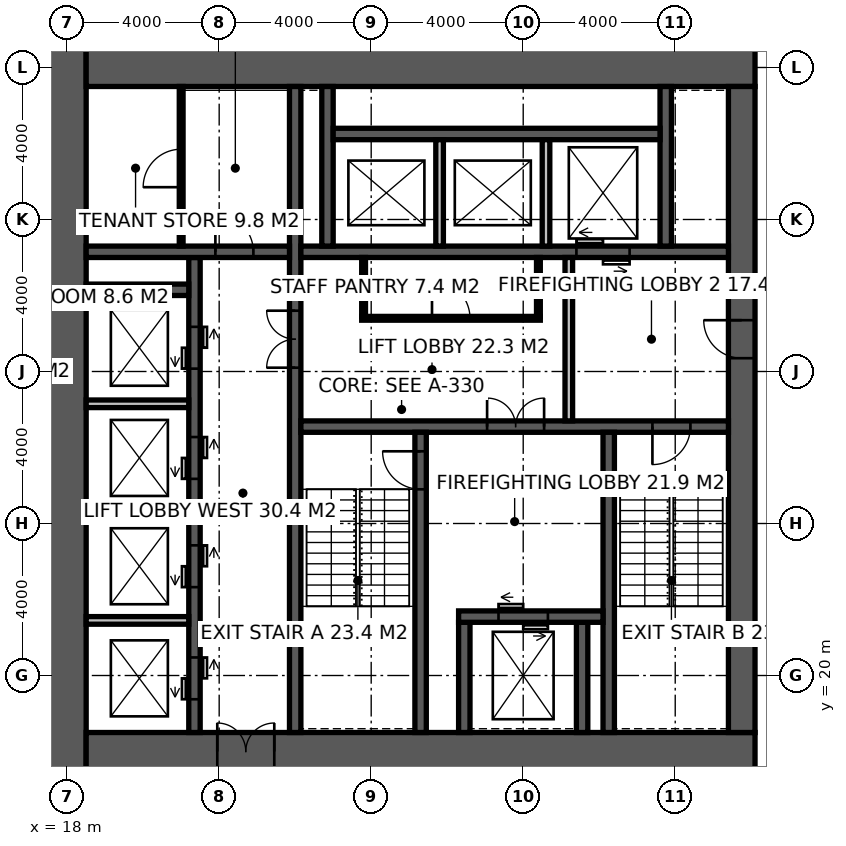
"""IFC4 building model, lengths in metres.
Left out: names, types, materials, properties, quantities, classifications, styles, units other than length and angle.
Written with IfcOpenShell. Run it as: python <this file> out.ifc"""

import sys

from ifc_helpers import new_model, si_unit, direction, frame, frame_2d, origin, place, context, subcontext, project, spatial, rectangle, extrude, element, fill, save


model = new_model("IFC4")
c1 = context("Model", 3, precision=1e-05, world=origin(), true_north=direction((0.0, 1.0)))
c2 = subcontext(c1, "Body", "Model", "MODEL_VIEW")
j1 = project(units=[si_unit("LENGTHUNIT", "METRE"), si_unit("PLANEANGLEUNIT", "RADIAN")], contexts=[c1])
p1 = place(None, origin())
s1 = spatial("IfcSite", under=j1, at=p1, CompositionType="ELEMENT")
p2 = place(p1, origin())
s2 = spatial("IfcBuilding", under=s1, at=p2, CompositionType="ELEMENT")
p3 = place(p2, frame((0.0, 0.0, 171.8)))
s3 = spatial("IfcBuildingStorey", under=s2, at=p3, CompositionType="ELEMENT", Elevation=171.8)
p4 = place(p3, frame((18.0, 17.5, -0.15), z_axis=(0.0, 0.0, 1.0), x_axis=(0.0, 1.0, 0.0)))
e1 = element("IfcWall", 1, at=p4, inside=s3, PredefinedType="SHEAR", context=c2, shape_type="SweptSolid", body=[
    extrude(rectangle(XDim=19.0, YDim=1.0, at=frame_2d((9.5, 0.0))), origin(), (0.0, 0.0, 1.0), 4.0),
])
p5 = place(p3, frame((18.5, 18.0, -0.15), z_axis=(0.0, 0.0, 1.0), x_axis=(1.0, 0.0, 0.0)))
e2 = element("IfcWall", 2, at=p5, inside=s3, PredefinedType="SHEAR", context=c2, shape_type="SweptSolid", body=[
    extrude(rectangle(XDim=17.6, YDim=1.0, at=frame_2d((8.8, 0.0))), origin(), (0.0, 0.0, 1.0), 4.0),
])
p6 = place(p5, frame((3.45, 0.0, 0.15)))
e3 = element("IfcOpeningElement", 3, at=p6, cuts=e2, PredefinedType="OPENING", context=c2, shape_type="SweptSolid", body=[
    extrude(rectangle(XDim=1.5, YDim=2.4, at=frame_2d((0.75, 1.2))), frame((0.0, 0.51, 0.0), z_axis=(0.0, -1.0, 0.0), x_axis=(1.0, 0.0, 0.0)), (0.0, 0.0, 1.0), 1.02),
])
p7 = place(p3, frame((18.5, 36.0, -0.15), z_axis=(0.0, 0.0, 1.0), x_axis=(1.0, 0.0, 0.0)))
e4 = element("IfcWall", 4, at=p7, inside=s3, PredefinedType="SHEAR", context=c2, shape_type="SweptSolid", body=[
    extrude(rectangle(XDim=17.6, YDim=1.0, at=frame_2d((8.8, 0.0))), origin(), (0.0, 0.0, 1.0), 4.0),
])
p8 = place(p3, frame((35.75, 18.5, -0.15), z_axis=(0.0, 0.0, 1.0), x_axis=(0.0, 1.0, 0.0)))
e5 = element("IfcWall", 5, at=p8, inside=s3, PredefinedType="SHEAR", context=c2, shape_type="SweptSolid", body=[
    extrude(rectangle(XDim=17.0, YDim=0.7, at=frame_2d((8.5, 0.0))), origin(), (0.0, 0.0, 1.0), 4.0),
])
p9 = place(p8, frame((9.85, 0.0, 0.15)))
e6 = element("IfcOpeningElement", 6, at=p9, cuts=e5, PredefinedType="OPENING", context=c2, shape_type="SweptSolid", body=[
    extrude(rectangle(XDim=1.0, YDim=2.2, at=frame_2d((0.5, 1.1))), frame((0.0, 0.36, 0.0), z_axis=(0.0, -1.0, 0.0), x_axis=(1.0, 0.0, 0.0)), (0.0, 0.0, 1.0), 0.72),
])
p10 = place(p3, frame((24.0, 18.5, -0.15), z_axis=(0.0, 0.0, 1.0), x_axis=(0.0, 1.0, 0.0)))
e7 = element("IfcWall", 7, at=p10, inside=s3, PredefinedType="SHEAR", context=c2, shape_type="SweptSolid", body=[
    extrude(rectangle(XDim=17.0, YDim=0.3, at=frame_2d((8.5, 0.0))), origin(), (0.0, 0.0, 1.0), 4.0),
])
p11 = place(p10, frame((9.6, 0.0, 0.15)))
e8 = element("IfcOpeningElement", 8, at=p11, cuts=e7, PredefinedType="OPENING", context=c2, shape_type="SweptSolid", body=[
    extrude(rectangle(XDim=1.5, YDim=2.4, at=frame_2d((0.75, 1.2))), frame((0.0, 0.16, 0.0), z_axis=(0.0, -1.0, 0.0), x_axis=(1.0, 0.0, 0.0)), (0.0, 0.0, 1.0), 0.32),
])
p12 = place(p3, frame((24.15, 26.55, -0.15), z_axis=(0.0, 0.0, 1.0), x_axis=(1.0, 0.0, 0.0)))
e9 = element("IfcWall", 9, at=p12, inside=s3, PredefinedType="SHEAR", context=c2, shape_type="SweptSolid", body=[
    extrude(rectangle(XDim=11.25, YDim=0.3, at=frame_2d((5.625, 0.0))), origin(), (0.0, 0.0, 1.0), 4.0),
])
p13 = place(p12, frame((9.25, 0.0, 0.15)))
e10 = element("IfcOpeningElement", 10, at=p13, cuts=e9, PredefinedType="OPENING", context=c2, shape_type="SweptSolid", body=[
    extrude(rectangle(XDim=1.0, YDim=2.2, at=frame_2d((0.5, 1.1))), frame((0.0, 0.16, 0.0), z_axis=(0.0, -1.0, 0.0), x_axis=(1.0, 0.0, 0.0)), (0.0, 0.0, 1.0), 0.32),
])
p14 = place(p12, frame((4.9, 0.0, 0.15)))
e11 = element("IfcOpeningElement", 11, at=p14, cuts=e9, PredefinedType="OPENING", context=c2, shape_type="SweptSolid", body=[
    extrude(rectangle(XDim=1.5, YDim=2.4, at=frame_2d((0.75, 1.2))), frame((0.0, 0.16, 0.0), z_axis=(0.0, -1.0, 0.0), x_axis=(1.0, 0.0, 0.0)), (0.0, 0.0, 1.0), 0.32),
])
p15 = place(p3, frame((27.3, 18.5, -0.15), z_axis=(0.0, 0.0, 1.0), x_axis=(0.0, 1.0, 0.0)))
e12 = element("IfcWall", 12, at=p15, inside=s3, PredefinedType="SHEAR", context=c2, shape_type="SweptSolid", body=[
    extrude(rectangle(XDim=7.9, YDim=0.3, at=frame_2d((3.95, 0.0))), origin(), (0.0, 0.0, 1.0), 4.0),
])
p16 = place(p15, frame((6.4, 0.0, 0.15)))
e13 = element("IfcOpeningElement", 13, at=p16, cuts=e12, PredefinedType="OPENING", context=c2, shape_type="SweptSolid", body=[
    extrude(rectangle(XDim=1.0, YDim=2.2, at=frame_2d((0.5, 1.1))), frame((0.0, 0.16, 0.0), z_axis=(0.0, -1.0, 0.0), x_axis=(1.0, 0.0, 0.0)), (0.0, 0.0, 1.0), 0.32),
])
p17 = place(p3, frame((32.25, 18.5, -0.15), z_axis=(0.0, 0.0, 1.0), x_axis=(0.0, 1.0, 0.0)))
e14 = element("IfcWall", 14, at=p17, inside=s3, PredefinedType="SHEAR", context=c2, shape_type="SweptSolid", body=[
    extrude(rectangle(XDim=7.9, YDim=0.3, at=frame_2d((3.95, 0.0))), origin(), (0.0, 0.0, 1.0), 4.0),
])
for number, where, z_axis, x_axis in (
    (15, (28.45, 18.5, -0.15), (0.0, 0.0, 1.0), (0.0, 1.0, 0.0)),
    (16, (31.55, 18.5, -0.15), (0.0, 0.0, 1.0), (0.0, 1.0, 0.0)),
):
    element("IfcWall", number, at=place(p3, frame(where, z_axis=z_axis, x_axis=x_axis)), inside=s3, PredefinedType="SHEAR", context=c2, shape_type="SweptSolid", body=[
        extrude(rectangle(XDim=2.9, YDim=0.3, at=frame_2d((1.45, 0.0))), origin(), (0.0, 0.0, 1.0), 4.0),
    ])
p18 = place(p3, frame((28.3, 21.55, -0.15), z_axis=(0.0, 0.0, 1.0), x_axis=(1.0, 0.0, 0.0)))
e17 = element("IfcWall", 17, at=p18, inside=s3, PredefinedType="SHEAR", context=c2, shape_type="SweptSolid", body=[
    extrude(rectangle(XDim=3.8, YDim=0.3, at=frame_2d((1.9, 0.0))), origin(), (0.0, 0.0, 1.0), 4.0),
])
p19 = place(p18, frame((1.05, 0.0, 0.15)))
e18 = element("IfcOpeningElement", 18, at=p19, cuts=e17, PredefinedType="OPENING", context=c2, shape_type="SweptSolid", body=[
    extrude(rectangle(XDim=1.3, YDim=2.4, at=frame_2d((0.65, 1.2))), frame((0.0, 0.16, 0.0), z_axis=(0.0, -1.0, 0.0), x_axis=(1.0, 0.0, 0.0)), (0.0, 0.0, 1.0), 0.32),
])
p20 = place(p3, frame((24.15, 31.15, -0.15), z_axis=(0.0, 0.0, 1.0), x_axis=(1.0, 0.0, 0.0)))
e19 = element("IfcWall", 19, at=p20, inside=s3, PredefinedType="SHEAR", context=c2, shape_type="SweptSolid", body=[
    extrude(rectangle(XDim=11.25, YDim=0.3, at=frame_2d((5.625, 0.0))), origin(), (0.0, 0.0, 1.0), 4.0),
])
p21 = place(p20, frame((7.25, 0.0, 0.15)))
e20 = element("IfcOpeningElement", 20, at=p21, cuts=e19, PredefinedType="OPENING", context=c2, shape_type="SweptSolid", body=[
    extrude(rectangle(XDim=1.4, YDim=2.4, at=frame_2d((0.7, 1.2))), frame((0.0, 0.16, 0.0), z_axis=(0.0, -1.0, 0.0), x_axis=(1.0, 0.0, 0.0)), (0.0, 0.0, 1.0), 0.32),
])
p22 = place(p3, frame((21.35, 18.5, -0.15), z_axis=(0.0, 0.0, 1.0), x_axis=(0.0, 1.0, 0.0)))
e21 = element("IfcWall", 21, at=p22, inside=s3, PredefinedType="SHEAR", context=c2, shape_type="SweptSolid", body=[
    extrude(rectangle(XDim=12.5, YDim=0.3, at=frame_2d((6.25, 0.0))), origin(), (0.0, 0.0, 1.0), 4.0),
])
p23 = place(p22, frame((0.875, 0.0, 0.15)))
e22 = element("IfcOpeningElement", 22, at=p23, cuts=e21, PredefinedType="OPENING", context=c2, shape_type="SweptSolid", body=[
    extrude(rectangle(XDim=1.1, YDim=2.2, at=frame_2d((0.55, 1.1))), frame((0.0, 0.16, 0.0), z_axis=(0.0, -1.0, 0.0), x_axis=(1.0, 0.0, 0.0)), (0.0, 0.0, 1.0), 0.32),
])
p24 = place(p22, frame((3.825, 0.0, 0.15)))
e23 = element("IfcOpeningElement", 23, at=p24, cuts=e21, PredefinedType="OPENING", context=c2, shape_type="SweptSolid", body=[
    extrude(rectangle(XDim=1.1, YDim=2.2, at=frame_2d((0.55, 1.1))), frame((0.0, 0.16, 0.0), z_axis=(0.0, -1.0, 0.0), x_axis=(1.0, 0.0, 0.0)), (0.0, 0.0, 1.0), 0.32),
])
p25 = place(p22, frame((6.675, 0.0, 0.15)))
e24 = element("IfcOpeningElement", 24, at=p25, cuts=e21, PredefinedType="OPENING", context=c2, shape_type="SweptSolid", body=[
    extrude(rectangle(XDim=1.1, YDim=2.2, at=frame_2d((0.55, 1.1))), frame((0.0, 0.16, 0.0), z_axis=(0.0, -1.0, 0.0), x_axis=(1.0, 0.0, 0.0)), (0.0, 0.0, 1.0), 0.32),
])
p26 = place(p22, frame((9.575, 0.0, 0.15)))
e25 = element("IfcOpeningElement", 25, at=p26, cuts=e21, PredefinedType="OPENING", context=c2, shape_type="SweptSolid", body=[
    extrude(rectangle(XDim=1.1, YDim=2.2, at=frame_2d((0.55, 1.1))), frame((0.0, 0.16, 0.0), z_axis=(0.0, -1.0, 0.0), x_axis=(1.0, 0.0, 0.0)), (0.0, 0.0, 1.0), 0.32),
])
p27 = place(p3, frame((18.5, 31.15, -0.15), z_axis=(0.0, 0.0, 1.0), x_axis=(1.0, 0.0, 0.0)))
e26 = element("IfcWall", 26, at=p27, inside=s3, PredefinedType="SHEAR", context=c2, shape_type="SweptSolid", body=[
    extrude(rectangle(XDim=5.35, YDim=0.3, at=frame_2d((2.675, 0.0))), origin(), (0.0, 0.0, 1.0), 4.0),
])
p28 = place(p27, frame((3.4, 0.0, 0.15)))
e27 = element("IfcOpeningElement", 27, at=p28, cuts=e26, PredefinedType="OPENING", context=c2, shape_type="SweptSolid", body=[
    extrude(rectangle(XDim=1.0, YDim=2.2, at=frame_2d((0.5, 1.1))), frame((0.0, 0.16, 0.0), z_axis=(0.0, -1.0, 0.0), x_axis=(1.0, 0.0, 0.0)), (0.0, 0.0, 1.0), 0.32),
])
p29 = place(p3, frame((18.5, 30.15, -0.15), z_axis=(0.0, 0.0, 1.0), x_axis=(1.0, 0.0, 0.0)))
e28 = element("IfcWall", 28, at=p29, inside=s3, PredefinedType="SHEAR", context=c2, shape_type="SweptSolid", body=[
    extrude(rectangle(XDim=2.7, YDim=0.3, at=frame_2d((1.35, 0.0))), origin(), (0.0, 0.0, 1.0), 4.0),
])
for number, where, z_axis, x_axis in (
    (29, (24.85, 31.3, -0.15), (0.0, 0.0, 1.0), (0.0, 1.0, 0.0)),
    (30, (33.75, 31.3, -0.15), (0.0, 0.0, 1.0), (0.0, 1.0, 0.0)),
):
    element("IfcWall", number, at=place(p3, frame(where, z_axis=z_axis, x_axis=x_axis)), inside=s3, PredefinedType="SHEAR", context=c2, shape_type="SweptSolid", body=[
        extrude(rectangle(XDim=4.2, YDim=0.3, at=frame_2d((2.1, 0.0))), origin(), (0.0, 0.0, 1.0), 4.0),
    ])
p30 = place(p3, frame((25.0, 34.25, -0.15), z_axis=(0.0, 0.0, 1.0), x_axis=(1.0, 0.0, 0.0)))
e31 = element("IfcWall", 31, at=p30, inside=s3, PredefinedType="SHEAR", context=c2, shape_type="SweptSolid", body=[
    extrude(rectangle(XDim=8.6, YDim=0.3, at=frame_2d((4.3, 0.0))), origin(), (0.0, 0.0, 1.0), 4.0),
])
for number, where, z_axis, x_axis in (
    (32, (27.8, 31.3, -0.15), (0.0, 0.0, 1.0), (0.0, 1.0, 0.0)),
    (33, (30.6, 31.3, -0.15), (0.0, 0.0, 1.0), (0.0, 1.0, 0.0)),
):
    element("IfcWall", number, at=place(p3, frame(where, z_axis=z_axis, x_axis=x_axis)), inside=s3, PredefinedType="SOLIDWALL", context=c2, shape_type="SweptSolid", body=[
        extrude(rectangle(XDim=2.8, YDim=0.2, at=frame_2d((1.4, 0.0))), origin(), (0.0, 0.0, 1.0), 4.0),
    ])
for number, where, z_axis, x_axis in (
    (34, (18.5, 21.45, -0.15), (0.0, 0.0, 1.0), (1.0, 0.0, 0.0)),
    (35, (18.5, 24.3, -0.15), (0.0, 0.0, 1.0), (1.0, 0.0, 0.0)),
    (36, (18.5, 27.15, -0.15), (0.0, 0.0, 1.0), (1.0, 0.0, 0.0)),
):
    element("IfcWall", number, at=place(p3, frame(where, z_axis=z_axis, x_axis=x_axis)), inside=s3, PredefinedType="SOLIDWALL", context=c2, shape_type="SweptSolid", body=[
        extrude(rectangle(XDim=2.7, YDim=0.2, at=frame_2d((1.35, 0.0))), origin(), (0.0, 0.0, 1.0), 4.0),
    ])
p31 = place(p3, frame((31.2, 26.7, 0.0), z_axis=(0.0, 0.0, 1.0), x_axis=(0.0, 1.0, 0.0)))
e37 = element("IfcWall", 37, at=p31, inside=s3, PredefinedType="SOLIDWALL", context=c2, shape_type="SweptSolid", body=[
    extrude(rectangle(XDim=4.3, YDim=0.2, at=frame_2d((2.15, 0.0))), origin(), (0.0, 0.0, 1.0), 3.85),
])
p32 = place(p3, frame((21.0, 31.3, 0.0), z_axis=(0.0, 0.0, 1.0), x_axis=(0.0, 1.0, 0.0)))
e38 = element("IfcWall", 38, at=p32, inside=s3, PredefinedType="PARTITIONING", context=c2, shape_type="SweptSolid", body=[
    extrude(rectangle(XDim=4.2, YDim=0.1, at=frame_2d((2.1, 0.0))), origin(), (0.0, 0.0, 1.0), 3.85),
])
p33 = place(p32, frame((1.55, 0.0, 0.0)))
e39 = element("IfcOpeningElement", 39, at=p33, cuts=e38, PredefinedType="OPENING", context=c2, shape_type="SweptSolid", body=[
    extrude(rectangle(XDim=1.0, YDim=2.2, at=frame_2d((0.5, 1.1))), frame((0.0, 0.06, 0.0), z_axis=(0.0, -1.0, 0.0), x_axis=(1.0, 0.0, 0.0)), (0.0, 0.0, 1.0), 0.12),
])
p34 = place(p3, frame((25.75, 29.4, 0.0), z_axis=(0.0, 0.0, 1.0), x_axis=(1.0, 0.0, 0.0)))
e40 = element("IfcWall", 40, at=p34, inside=s3, PredefinedType="PARTITIONING", context=c2, shape_type="SweptSolid", body=[
    extrude(rectangle(XDim=4.7, YDim=0.1, at=frame_2d((2.35, 0.0))), origin(), (0.0, 0.0, 1.0), 3.85),
])
p35 = place(p34, frame((1.85, 0.0, 0.0)))
e41 = element("IfcOpeningElement", 41, at=p35, cuts=e40, PredefinedType="OPENING", context=c2, shape_type="SweptSolid", body=[
    extrude(rectangle(XDim=1.0, YDim=2.2, at=frame_2d((0.5, 1.1))), frame((0.0, 0.06, 0.0), z_axis=(0.0, -1.0, 0.0), x_axis=(1.0, 0.0, 0.0)), (0.0, 0.0, 1.0), 0.12),
])
for number, where, z_axis, x_axis in (
    (42, (25.8, 29.45, 0.0), (0.0, 0.0, 1.0), (0.0, 1.0, 0.0)),
    (43, (30.4, 29.45, 0.0), (0.0, 0.0, 1.0), (0.0, 1.0, 0.0)),
):
    element("IfcWall", number, at=place(p3, frame(where, z_axis=z_axis, x_axis=x_axis)), inside=s3, PredefinedType="PARTITIONING", context=c2, shape_type="SweptSolid", body=[
        extrude(rectangle(XDim=1.55, YDim=0.1, at=frame_2d((0.775, 0.0))), origin(), (0.0, 0.0, 1.0), 3.85),
    ])
p36 = place(p16, origin())
e44 = element("IfcDoor", 44, at=p36, inside=s3, OperationType="SINGLE_SWING_RIGHT", PredefinedType="DOOR", context=c2, shape_type="SweptSolid", body=[
    extrude(rectangle(XDim=1.0, YDim=2.2, at=frame_2d((0.5, 1.1))), frame((0.0, 0.025, 0.0), z_axis=(0.0, -1.0, 0.0), x_axis=(1.0, 0.0, 0.0)), (0.0, 0.0, 1.0), 0.05),
])
fill(e13, e44)
p37 = place(p13, frame((1.0, 0.0, 0.0), z_axis=(0.0, 0.0, 1.0), x_axis=(-1.0, 0.0, 0.0)))
e45 = element("IfcDoor", 45, at=p37, inside=s3, OperationType="SINGLE_SWING_RIGHT", PredefinedType="DOOR", context=c2, shape_type="SweptSolid", body=[
    extrude(rectangle(XDim=1.0, YDim=2.2, at=frame_2d((0.5, 1.1))), frame((0.0, 0.025, 0.0), z_axis=(0.0, -1.0, 0.0), x_axis=(1.0, 0.0, 0.0)), (0.0, 0.0, 1.0), 0.05),
])
fill(e10, e45)
p38 = place(p9, origin())
e46 = element("IfcDoor", 46, at=p38, inside=s3, OperationType="SINGLE_SWING_RIGHT", PredefinedType="DOOR", context=c2, shape_type="SweptSolid", body=[
    extrude(rectangle(XDim=1.0, YDim=2.2, at=frame_2d((0.5, 1.1))), frame((0.0, 0.025, 0.0), z_axis=(0.0, -1.0, 0.0), x_axis=(1.0, 0.0, 0.0)), (0.0, 0.0, 1.0), 0.05),
])
fill(e6, e46)
p39 = place(p14, origin())
e47 = element("IfcDoor", 47, at=p39, inside=s3, OperationType="DOUBLE_DOOR_DOUBLE_SWING", PredefinedType="DOOR", context=c2, shape_type="SweptSolid", body=[
    extrude(rectangle(XDim=1.5, YDim=2.4, at=frame_2d((0.75, 1.2))), frame((0.0, 0.025, 0.0), z_axis=(0.0, -1.0, 0.0), x_axis=(1.0, 0.0, 0.0)), (0.0, 0.0, 1.0), 0.05),
])
fill(e11, e47)
p40 = place(p11, origin())
e48 = element("IfcDoor", 48, at=p40, inside=s3, OperationType="DOUBLE_DOOR_DOUBLE_SWING", PredefinedType="DOOR", context=c2, shape_type="SweptSolid", body=[
    extrude(rectangle(XDim=1.5, YDim=2.4, at=frame_2d((0.75, 1.2))), frame((0.0, 0.025, 0.0), z_axis=(0.0, -1.0, 0.0), x_axis=(1.0, 0.0, 0.0)), (0.0, 0.0, 1.0), 0.05),
])
fill(e8, e48)
p41 = place(p28, origin())
e49 = element("IfcDoor", 49, at=p41, inside=s3, OperationType="SINGLE_SWING_LEFT", PredefinedType="DOOR", context=c2, shape_type="SweptSolid", body=[
    extrude(rectangle(XDim=1.0, YDim=2.2, at=frame_2d((0.5, 1.1))), frame((0.0, 0.025, 0.0), z_axis=(0.0, -1.0, 0.0), x_axis=(1.0, 0.0, 0.0)), (0.0, 0.0, 1.0), 0.05),
])
fill(e27, e49)
p42 = place(p33, origin())
e50 = element("IfcDoor", 50, at=p42, inside=s3, OperationType="SINGLE_SWING_LEFT", PredefinedType="DOOR", context=c2, shape_type="SweptSolid", body=[
    extrude(rectangle(XDim=1.0, YDim=2.2, at=frame_2d((0.5, 1.1))), frame((0.0, 0.025, 0.0), z_axis=(0.0, -1.0, 0.0), x_axis=(1.0, 0.0, 0.0)), (0.0, 0.0, 1.0), 0.05),
])
fill(e39, e50)
p43 = place(p35, origin())
e51 = element("IfcDoor", 51, at=p43, inside=s3, OperationType="SINGLE_SWING_LEFT", PredefinedType="DOOR", context=c2, shape_type="SweptSolid", body=[
    extrude(rectangle(XDim=1.0, YDim=2.2, at=frame_2d((0.5, 1.1))), frame((0.0, 0.025, 0.0), z_axis=(0.0, -1.0, 0.0), x_axis=(1.0, 0.0, 0.0)), (0.0, 0.0, 1.0), 0.05),
])
fill(e41, e51)
p44 = place(p6, origin())
e52 = element("IfcDoor", 52, at=p44, inside=s3, OperationType="DOUBLE_DOOR_DOUBLE_SWING", PredefinedType="DOOR", context=c2, shape_type="SweptSolid", body=[
    extrude(rectangle(XDim=1.5, YDim=2.4, at=frame_2d((0.75, 1.2))), frame((0.0, 0.025, 0.0), z_axis=(0.0, -1.0, 0.0), x_axis=(1.0, 0.0, 0.0)), (0.0, 0.0, 1.0), 0.05),
])
fill(e3, e52)
p45 = place(p19, origin())
e53 = element("IfcDoor", 53, at=p45, inside=s3, OperationType="DOUBLE_DOOR_SLIDING", PredefinedType="DOOR", context=c2, shape_type="SweptSolid", body=[
    extrude(rectangle(XDim=1.3, YDim=2.4, at=frame_2d((0.65, 1.2))), frame((0.0, 0.025, 0.0), z_axis=(0.0, -1.0, 0.0), x_axis=(1.0, 0.0, 0.0)), (0.0, 0.0, 1.0), 0.05),
])
fill(e18, e53)
p46 = place(p21, origin())
e54 = element("IfcDoor", 54, at=p46, inside=s3, OperationType="DOUBLE_DOOR_SLIDING", PredefinedType="DOOR", context=c2, shape_type="SweptSolid", body=[
    extrude(rectangle(XDim=1.4, YDim=2.4, at=frame_2d((0.7, 1.2))), frame((0.0, 0.025, 0.0), z_axis=(0.0, -1.0, 0.0), x_axis=(1.0, 0.0, 0.0)), (0.0, 0.0, 1.0), 0.05),
])
fill(e20, e54)
p47 = place(p23, origin())
e55 = element("IfcDoor", 55, at=p47, inside=s3, OperationType="DOUBLE_DOOR_SLIDING", PredefinedType="DOOR", context=c2, shape_type="SweptSolid", body=[
    extrude(rectangle(XDim=1.1, YDim=2.2, at=frame_2d((0.55, 1.1))), frame((0.0, 0.025, 0.0), z_axis=(0.0, -1.0, 0.0), x_axis=(1.0, 0.0, 0.0)), (0.0, 0.0, 1.0), 0.05),
])
fill(e22, e55)
p48 = place(p24, origin())
e56 = element("IfcDoor", 56, at=p48, inside=s3, OperationType="DOUBLE_DOOR_SLIDING", PredefinedType="DOOR", context=c2, shape_type="SweptSolid", body=[
    extrude(rectangle(XDim=1.1, YDim=2.2, at=frame_2d((0.55, 1.1))), frame((0.0, 0.025, 0.0), z_axis=(0.0, -1.0, 0.0), x_axis=(1.0, 0.0, 0.0)), (0.0, 0.0, 1.0), 0.05),
])
fill(e23, e56)
p49 = place(p25, origin())
e57 = element("IfcDoor", 57, at=p49, inside=s3, OperationType="DOUBLE_DOOR_SLIDING", PredefinedType="DOOR", context=c2, shape_type="SweptSolid", body=[
    extrude(rectangle(XDim=1.1, YDim=2.2, at=frame_2d((0.55, 1.1))), frame((0.0, 0.025, 0.0), z_axis=(0.0, -1.0, 0.0), x_axis=(1.0, 0.0, 0.0)), (0.0, 0.0, 1.0), 0.05),
])
fill(e24, e57)
p50 = place(p26, origin())
e58 = element("IfcDoor", 58, at=p50, inside=s3, OperationType="DOUBLE_DOOR_SLIDING", PredefinedType="DOOR", context=c2, shape_type="SweptSolid", body=[
    extrude(rectangle(XDim=1.1, YDim=2.2, at=frame_2d((0.55, 1.1))), frame((0.0, 0.025, 0.0), z_axis=(0.0, -1.0, 0.0), x_axis=(1.0, 0.0, 0.0)), (0.0, 0.0, 1.0), 0.05),
])
fill(e25, e58)
save(model, sys.argv[1])
